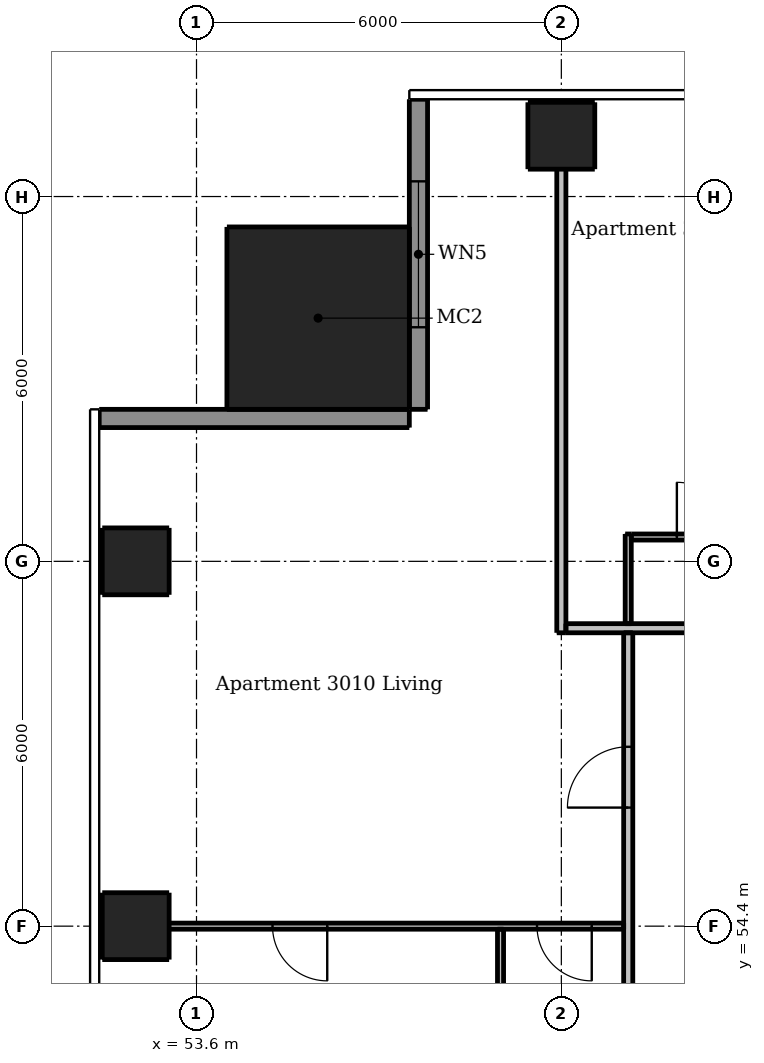
"""IFC4 building model, lengths in metres.
Left out: names, types, materials, properties, quantities, classifications, styles, units other than length and angle.
Written with IfcOpenShell. Run it as: python <this file> out.ifc"""

import sys

from ifc_helpers import new_model, si_unit, direction, frame, frame_2d, origin, origin_2d, place, context, subcontext, project, spatial, rectangle, extrude, element, fill, save


model = new_model("IFC4")
c1 = context("Model", 3, precision=1e-05, world=origin(), true_north=direction((0.0, 1.0)))
c2 = subcontext(c1, "Body", "Model", "MODEL_VIEW")
j1 = project(units=[si_unit("LENGTHUNIT", "METRE"), si_unit("PLANEANGLEUNIT", "RADIAN")], contexts=[c1])
p1 = place(None, origin())
s1 = spatial("IfcSite", under=j1, at=p1, CompositionType="ELEMENT")
p2 = place(p1, origin())
s2 = spatial("IfcBuilding", under=s1, at=p2, CompositionType="ELEMENT")
p3 = place(p2, frame((0.0, 0.0, 111.7)))
s3 = spatial("IfcBuildingStorey", under=s2, at=p3, CompositionType="ELEMENT", Elevation=111.7)
for number, where, z_axis, x_axis in (
    (1, (59.6, 67.4, 0.0), (0.0, 0.0, 1.0), (1.0, 0.0, 0.0)),
    (2, (52.6, 54.4, 0.0), (0.0, 0.0, 1.0), (1.0, 0.0, 0.0)),
    (3, (52.6, 60.4, 0.0), (0.0, 0.0, 1.0), (1.0, 0.0, 0.0)),
):
    element("IfcColumn", number, at=place(p3, frame(where, z_axis=z_axis, x_axis=x_axis)), inside=s3, PredefinedType="COLUMN", context=c2, shape_type="SweptSolid", body=[
        extrude(rectangle(XDim=1.1, YDim=1.1, at=origin_2d()), origin(), (0.0, 0.0, 1.0), 3.05),
    ])
p4 = place(p3, frame((55.6, 64.4, 0.0), z_axis=(0.0, 0.0, 1.0), x_axis=(1.0, 0.0, 0.0)))
e4 = element("IfcColumn", 4, at=p4, inside=s3, PredefinedType="COLUMN", context=c2, shape_type="SweptSolid", body=[
    extrude(rectangle(XDim=3.0, YDim=3.0, at=origin_2d()), origin(), (0.0, 0.0, 1.0), 3.3),
])
p5 = place(p3, frame((57.25, 68.0, 0.0), z_axis=(0.0, 0.0, 1.0), x_axis=(0.0, -1.0, 0.0)))
e5 = element("IfcWall", 5, at=p5, inside=s3, PredefinedType="SOLIDWALL", context=c2, shape_type="SweptSolid", body=[
    extrude(rectangle(XDim=5.1, YDim=0.3, at=frame_2d((2.55, 0.0))), origin(), (0.0, 0.0, 1.0), 3.05),
])
p6 = place(p5, frame((1.35, 0.0, 0.15)))
e6 = element("IfcOpeningElement", 6, at=p6, cuts=e5, PredefinedType="OPENING", context=c2, shape_type="SweptSolid", body=[
    extrude(rectangle(XDim=2.4, YDim=2.1, at=frame_2d((1.2, 1.05))), frame((0.0, 0.16, 0.0), z_axis=(0.0, -1.0, 0.0), x_axis=(1.0, 0.0, 0.0)), (0.0, 0.0, 1.0), 0.32),
])
p7 = place(p3, frame((57.1, 62.75, 0.0), z_axis=(0.0, 0.0, 1.0), x_axis=(-1.0, 0.0, 0.0)))
e7 = element("IfcWall", 7, at=p7, inside=s3, PredefinedType="SOLIDWALL", context=c2, shape_type="SweptSolid", body=[
    extrude(rectangle(XDim=5.1, YDim=0.3, at=frame_2d((2.55, 0.0))), origin(), (0.0, 0.0, 1.0), 3.05),
])
p8 = place(p3, frame((58.6, 54.35, 0.0), z_axis=(0.0, 0.0, 1.0), x_axis=(0.0, -1.0, 0.0)))
e8 = element("IfcWall", 8, at=p8, inside=s3, PredefinedType="PARTITIONING", context=c2, shape_type="SweptSolid", body=[
    extrude(rectangle(XDim=5.875, YDim=0.1, at=frame_2d((2.938, 0.0))), origin(), (0.0, 0.0, 1.0), 3.05),
])
p9 = place(p8, frame((3.75, 0.0, 0.0)))
e9 = element("IfcOpeningElement", 9, at=p9, cuts=e8, PredefinedType="OPENING", context=c2, shape_type="SweptSolid", body=[
    extrude(rectangle(XDim=0.8, YDim=2.1, at=frame_2d((0.4, 1.05))), frame((0.0, 0.06, 0.0), z_axis=(0.0, -1.0, 0.0), x_axis=(1.0, 0.0, 0.0)), (0.0, 0.0, 1.0), 0.12),
])
p10 = place(p3, frame((60.7, 59.375, 0.0), z_axis=(0.0, 0.0, 1.0), x_axis=(0.0, 1.0, 0.0)))
e10 = element("IfcWall", 10, at=p10, inside=s3, PredefinedType="PARTITIONING", context=c2, shape_type="SweptSolid", body=[
    extrude(rectangle(XDim=1.475, YDim=0.1, at=frame_2d((0.738, 0.0))), origin(), (0.0, 0.0, 1.0), 3.05),
])
p11 = place(p3, frame((60.75, 60.8, 0.0), z_axis=(0.0, 0.0, 1.0), x_axis=(1.0, 0.0, 0.0)))
e11 = element("IfcWall", 11, at=p11, inside=s3, PredefinedType="PARTITIONING", context=c2, shape_type="SweptSolid", body=[
    extrude(rectangle(XDim=16.775, YDim=0.1, at=frame_2d((8.387, 0.0))), origin(), (0.0, 0.0, 1.0), 3.05),
])
p12 = place(p11, frame((6.2, 0.0, 0.0)))
e12 = element("IfcOpeningElement", 12, at=p12, cuts=e11, PredefinedType="OPENING", context=c2, shape_type="SweptSolid", body=[
    extrude(rectangle(XDim=0.9, YDim=2.1, at=frame_2d((0.45, 1.05))), frame((0.0, 0.06, 0.0), z_axis=(0.0, -1.0, 0.0), x_axis=(1.0, 0.0, 0.0)), (0.0, 0.0, 1.0), 0.12),
])
p13 = place(p11, frame((9.2, 0.0, 0.0)))
e13 = element("IfcOpeningElement", 13, at=p13, cuts=e11, PredefinedType="OPENING", context=c2, shape_type="SweptSolid", body=[
    extrude(rectangle(XDim=0.9, YDim=2.1, at=frame_2d((0.45, 1.05))), frame((0.0, 0.06, 0.0), z_axis=(0.0, -1.0, 0.0), x_axis=(1.0, 0.0, 0.0)), (0.0, 0.0, 1.0), 0.12),
])
p14 = place(p11, frame((0.75, 0.0, 0.0)))
e14 = element("IfcOpeningElement", 14, at=p14, cuts=e11, PredefinedType="OPENING", context=c2, shape_type="SweptSolid", body=[
    extrude(rectangle(XDim=0.9, YDim=2.1, at=frame_2d((0.45, 1.05))), frame((0.0, 0.06, 0.0), z_axis=(0.0, -1.0, 0.0), x_axis=(1.0, 0.0, 0.0)), (0.0, 0.0, 1.0), 0.12),
])
p15 = place(p11, frame((14.6, 0.0, 0.0)))
e15 = element("IfcOpeningElement", 15, at=p15, cuts=e11, PredefinedType="OPENING", context=c2, shape_type="SweptSolid", body=[
    extrude(rectangle(XDim=0.9, YDim=2.1, at=frame_2d((0.45, 1.05))), frame((0.0, 0.06, 0.0), z_axis=(0.0, -1.0, 0.0), x_axis=(1.0, 0.0, 0.0)), (0.0, 0.0, 1.0), 0.12),
])
p16 = place(p11, frame((3.25, 0.0, 0.0)))
e16 = element("IfcOpeningElement", 16, at=p16, cuts=e11, PredefinedType="OPENING", context=c2, shape_type="SweptSolid", body=[
    extrude(rectangle(XDim=0.8, YDim=2.1, at=frame_2d((0.4, 1.05))), frame((0.0, 0.06, 0.0), z_axis=(0.0, -1.0, 0.0), x_axis=(1.0, 0.0, 0.0)), (0.0, 0.0, 1.0), 0.12),
])
p17 = place(p11, frame((11.65, 0.0, 0.0)))
e17 = element("IfcOpeningElement", 17, at=p17, cuts=e11, PredefinedType="OPENING", context=c2, shape_type="SweptSolid", body=[
    extrude(rectangle(XDim=0.8, YDim=2.1, at=frame_2d((0.4, 1.05))), frame((0.0, 0.06, 0.0), z_axis=(0.0, -1.0, 0.0), x_axis=(1.0, 0.0, 0.0)), (0.0, 0.0, 1.0), 0.12),
])
p18 = place(p3, frame((60.625, 54.4, 0.0), z_axis=(0.0, 0.0, 1.0), x_axis=(-1.0, 0.0, 0.0)))
e18 = element("IfcWall", 18, at=p18, inside=s3, PredefinedType="PARTITIONING", context=c2, shape_type="SweptSolid", body=[
    extrude(rectangle(XDim=8.625, YDim=0.1, at=frame_2d((4.312, 0.0))), origin(), (0.0, 0.0, 1.0), 2.516),
])
p19 = place(p18, frame((0.525, 0.0, 0.0)))
e19 = element("IfcOpeningElement", 19, at=p19, cuts=e18, PredefinedType="OPENING", context=c2, shape_type="SweptSolid", body=[
    extrude(rectangle(XDim=0.9, YDim=2.1, at=frame_2d((0.45, 1.05))), frame((0.0, 0.06, 0.0), z_axis=(0.0, -1.0, 0.0), x_axis=(1.0, 0.0, 0.0)), (0.0, 0.0, 1.0), 0.12),
])
p20 = place(p18, frame((4.875, 0.0, 0.0)))
e20 = element("IfcOpeningElement", 20, at=p20, cuts=e18, PredefinedType="OPENING", context=c2, shape_type="SweptSolid", body=[
    extrude(rectangle(XDim=0.9, YDim=2.1, at=frame_2d((0.45, 1.05))), frame((0.0, 0.06, 0.0), z_axis=(0.0, -1.0, 0.0), x_axis=(1.0, 0.0, 0.0)), (0.0, 0.0, 1.0), 0.12),
])
p21 = place(p3, frame((59.6, 59.225, 0.0), z_axis=(0.0, 0.0, 1.0), x_axis=(0.0, 1.0, 0.0)))
e21 = element("IfcWall", 21, at=p21, inside=s3, PredefinedType="PARTITIONING", context=c2, shape_type="SweptSolid", body=[
    extrude(rectangle(XDim=8.775, YDim=0.15, at=frame_2d((4.387, 0.0))), origin(), (0.0, 0.0, 1.0), 2.51),
])
p22 = place(p3, frame((60.7, 30.325, 0.0), z_axis=(0.0, 0.0, 1.0), x_axis=(0.0, 1.0, 0.0)))
e22 = element("IfcWall", 22, at=p22, inside=s3, PredefinedType="PARTITIONING", context=c2, shape_type="SweptSolid", body=[
    extrude(rectangle(XDim=28.9, YDim=0.15, at=frame_2d((14.45, 0.0))), origin(), (0.0, 0.0, 1.0), 3.05),
])
p23 = place(p22, frame((9.225, 0.0, 0.0)))
e23 = element("IfcOpeningElement", 23, at=p23, cuts=e22, PredefinedType="OPENING", context=c2, shape_type="SweptSolid", body=[
    extrude(rectangle(XDim=1.0, YDim=2.1, at=frame_2d((0.5, 1.05))), frame((0.0, 0.085, 0.0), z_axis=(0.0, -1.0, 0.0), x_axis=(1.0, 0.0, 0.0)), (0.0, 0.0, 1.0), 0.17),
])
p24 = place(p22, frame((26.025, 0.0, 0.0)))
e24 = element("IfcOpeningElement", 24, at=p24, cuts=e22, PredefinedType="OPENING", context=c2, shape_type="SweptSolid", body=[
    extrude(rectangle(XDim=1.0, YDim=2.1, at=frame_2d((0.5, 1.05))), frame((0.0, 0.085, 0.0), z_axis=(0.0, -1.0, 0.0), x_axis=(1.0, 0.0, 0.0)), (0.0, 0.0, 1.0), 0.17),
])
p25 = place(p3, frame((59.675, 59.3, 0.0), z_axis=(0.0, 0.0, 1.0), x_axis=(1.0, 0.0, 0.0)))
e25 = element("IfcWall", 25, at=p25, inside=s3, PredefinedType="PARTITIONING", context=c2, shape_type="SweptSolid", body=[
    extrude(rectangle(XDim=28.55, YDim=0.15, at=frame_2d((14.275, 0.0))), origin(), (0.0, 0.0, 1.0), 3.05),
])
p26 = place(p25, frame((8.975, 0.0, 0.0)))
e26 = element("IfcOpeningElement", 26, at=p26, cuts=e25, PredefinedType="OPENING", context=c2, shape_type="SweptSolid", body=[
    extrude(rectangle(XDim=1.0, YDim=2.1, at=frame_2d((0.5, 1.05))), frame((0.0, 0.085, 0.0), z_axis=(0.0, -1.0, 0.0), x_axis=(1.0, 0.0, 0.0)), (0.0, 0.0, 1.0), 0.17),
])
p27 = place(p25, frame((25.775, 0.0, 0.0)))
e27 = element("IfcOpeningElement", 27, at=p27, cuts=e25, PredefinedType="OPENING", context=c2, shape_type="SweptSolid", body=[
    extrude(rectangle(XDim=1.0, YDim=2.1, at=frame_2d((0.5, 1.05))), frame((0.0, 0.085, 0.0), z_axis=(0.0, -1.0, 0.0), x_axis=(1.0, 0.0, 0.0)), (0.0, 0.0, 1.0), 0.17),
])
p28 = place(p6, origin())
e28 = element("IfcWindow", 28, at=p28, inside=s3, PartitioningType="DOUBLE_PANEL_VERTICAL", PredefinedType="WINDOW", context=c2, shape_type="SweptSolid", body=[
    extrude(rectangle(XDim=2.4, YDim=2.1, at=frame_2d((1.2, 1.05))), frame((0.0, 0.03, 0.0), z_axis=(0.0, -1.0, 0.0), x_axis=(1.0, 0.0, 0.0)), (0.0, 0.0, 1.0), 0.06),
])
fill(e6, e28)
p29 = place(p14, origin())
e29 = element("IfcDoor", 29, at=p29, inside=s3, OperationType="SINGLE_SWING_LEFT", PredefinedType="DOOR", context=c2, shape_type="SweptSolid", body=[
    extrude(rectangle(XDim=0.9, YDim=2.1, at=frame_2d((0.45, 1.05))), frame((0.0, 0.025, 0.0), z_axis=(0.0, -1.0, 0.0), x_axis=(1.0, 0.0, 0.0)), (0.0, 0.0, 1.0), 0.05),
])
fill(e14, e29)
p30 = place(p24, origin())
e30 = element("IfcDoor", 30, at=p30, inside=s3, OperationType="SINGLE_SWING_LEFT", PredefinedType="DOOR", context=c2, shape_type="SweptSolid", body=[
    extrude(rectangle(XDim=1.0, YDim=2.1, at=frame_2d((0.5, 1.05))), frame((0.0, 0.025, 0.0), z_axis=(0.0, -1.0, 0.0), x_axis=(1.0, 0.0, 0.0)), (0.0, 0.0, 1.0), 0.05),
])
fill(e24, e30)
p31 = place(p19, origin())
e31 = element("IfcDoor", 31, at=p31, inside=s3, OperationType="SINGLE_SWING_LEFT", PredefinedType="DOOR", context=c2, shape_type="SweptSolid", body=[
    extrude(rectangle(XDim=0.9, YDim=2.1, at=frame_2d((0.45, 1.05))), frame((0.0, 0.025, 0.0), z_axis=(0.0, -1.0, 0.0), x_axis=(1.0, 0.0, 0.0)), (0.0, 0.0, 1.0), 0.05),
])
fill(e19, e31)
p32 = place(p20, origin())
e32 = element("IfcDoor", 32, at=p32, inside=s3, OperationType="SINGLE_SWING_LEFT", PredefinedType="DOOR", context=c2, shape_type="SweptSolid", body=[
    extrude(rectangle(XDim=0.9, YDim=2.1, at=frame_2d((0.45, 1.05))), frame((0.0, 0.025, 0.0), z_axis=(0.0, -1.0, 0.0), x_axis=(1.0, 0.0, 0.0)), (0.0, 0.0, 1.0), 0.05),
])
fill(e20, e32)
save(model, sys.argv[1])
